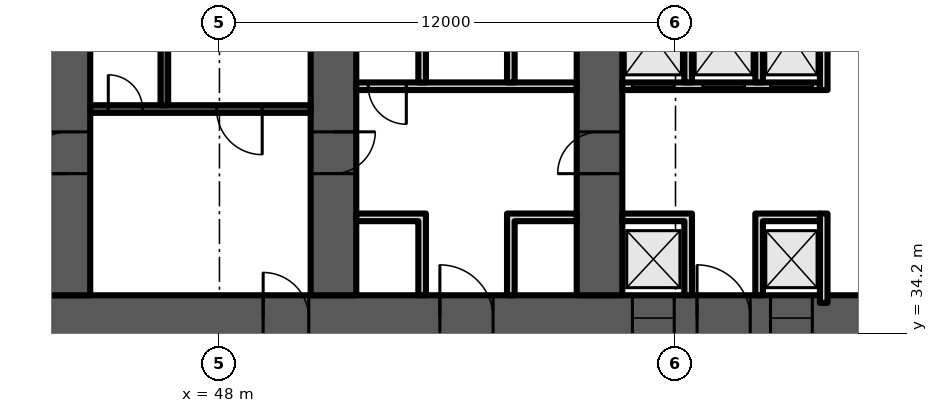
"""IFC4 building model, lengths in metres.
Left out: names, types, materials, properties, quantities, classifications, styles, units other than length and angle.
Written with IfcOpenShell. Run it as: python <this file> out.ifc"""

import sys

from ifc_helpers import new_model, si_unit, direction, frame, frame_2d, origin, place, context, subcontext, project, spatial, polyline, rectangle, outline, extrude, element, fill, save


model = new_model("IFC4")
c1 = context("Model", 3, precision=1e-05, world=origin(), true_north=direction((0.0, 1.0)))
c2 = subcontext(c1, "Body", "Model", "MODEL_VIEW")
j1 = project(units=[si_unit("LENGTHUNIT", "METRE"), si_unit("PLANEANGLEUNIT", "RADIAN")], contexts=[c1])
p1 = place(None, origin())
s1 = spatial("IfcSite", under=j1, at=p1, CompositionType="ELEMENT")
p2 = place(p1, origin())
s2 = spatial("IfcBuilding", under=s1, at=p2, CompositionType="ELEMENT")
p3 = place(p2, frame((0.0, 0.0, 33.0)))
s3 = spatial("IfcBuildingStorey", under=s2, at=p3, CompositionType="ELEMENT", Elevation=33.0)
p4 = place(p3, frame((9.0, 34.6, 0.0), z_axis=(0.0, 0.0, 1.0), x_axis=(1.0, 0.0, 0.0)))
e1 = element("IfcWall", 1, at=p4, inside=s3, PredefinedType="SHEAR", context=c2, shape_type="SweptSolid", body=[
    extrude(rectangle(XDim=56.0, YDim=1.2, at=frame_2d((28.0, 0.0))), origin(), (0.0, 0.0, 1.0), 8.1),
])
p5 = place(p4, frame((2.0, 0.0, 0.0)))
e2 = element("IfcOpeningElement", 2, at=p5, cuts=e1, PredefinedType="OPENING", context=c2, shape_type="SweptSolid", body=[
    extrude(rectangle(XDim=1.0, YDim=2.1, at=frame_2d((0.5, 1.05))), frame((0.0, 0.61, 0.0), z_axis=(0.0, -1.0, 0.0), x_axis=(1.0, 0.0, 0.0)), (0.0, 0.0, 1.0), 1.22),
])
p6 = place(p4, frame((4.6, 0.0, 0.0)))
e3 = element("IfcOpeningElement", 3, at=p6, cuts=e1, PredefinedType="OPENING", context=c2, shape_type="SweptSolid", body=[
    extrude(rectangle(XDim=1.0, YDim=2.1, at=frame_2d((0.5, 1.05))), frame((0.0, 0.61, 0.0), z_axis=(0.0, -1.0, 0.0), x_axis=(1.0, 0.0, 0.0)), (0.0, 0.0, 1.0), 1.22),
])
p7 = place(p4, frame((7.867, 0.0, 0.0)))
e4 = element("IfcOpeningElement", 4, at=p7, cuts=e1, PredefinedType="OPENING", context=c2, shape_type="SweptSolid", body=[
    extrude(rectangle(XDim=1.1, YDim=2.1, at=frame_2d((0.55, 1.05))), frame((0.0, 0.61, 0.0), z_axis=(0.0, -1.0, 0.0), x_axis=(1.0, 0.0, 0.0)), (0.0, 0.0, 1.0), 1.22),
])
p8 = place(p4, frame((12.033, 0.0, 0.0)))
e5 = element("IfcOpeningElement", 5, at=p8, cuts=e1, PredefinedType="OPENING", context=c2, shape_type="SweptSolid", body=[
    extrude(rectangle(XDim=1.1, YDim=2.1, at=frame_2d((0.55, 1.05))), frame((0.0, 0.61, 0.0), z_axis=(0.0, -1.0, 0.0), x_axis=(1.0, 0.0, 0.0)), (0.0, 0.0, 1.0), 1.22),
])
p9 = place(p4, frame((9.8, 0.0, 0.0)))
e6 = element("IfcOpeningElement", 6, at=p9, cuts=e1, PredefinedType="OPENING", context=c2, shape_type="SweptSolid", body=[
    extrude(rectangle(XDim=1.4, YDim=2.1, at=frame_2d((0.7, 1.05))), frame((0.0, 0.61, 0.0), z_axis=(0.0, -1.0, 0.0), x_axis=(1.0, 0.0, 0.0)), (0.0, 0.0, 1.0), 1.22),
])
p10 = place(p4, frame((14.65, 0.0, 0.0)))
e7 = element("IfcOpeningElement", 7, at=p10, cuts=e1, PredefinedType="OPENING", context=c2, shape_type="SweptSolid", body=[
    extrude(rectangle(XDim=1.2, YDim=2.1, at=frame_2d((0.6, 1.05))), frame((0.0, 0.61, 0.0), z_axis=(0.0, -1.0, 0.0), x_axis=(1.0, 0.0, 0.0)), (0.0, 0.0, 1.0), 1.22),
])
p11 = place(p4, frame((21.867, 0.0, 0.0)))
e8 = element("IfcOpeningElement", 8, at=p11, cuts=e1, PredefinedType="OPENING", context=c2, shape_type="SweptSolid", body=[
    extrude(rectangle(XDim=1.1, YDim=2.1, at=frame_2d((0.55, 1.05))), frame((0.0, 0.61, 0.0), z_axis=(0.0, -1.0, 0.0), x_axis=(1.0, 0.0, 0.0)), (0.0, 0.0, 1.0), 1.22),
])
p12 = place(p4, frame((26.033, 0.0, 0.0)))
e9 = element("IfcOpeningElement", 9, at=p12, cuts=e1, PredefinedType="OPENING", context=c2, shape_type="SweptSolid", body=[
    extrude(rectangle(XDim=1.1, YDim=2.1, at=frame_2d((0.55, 1.05))), frame((0.0, 0.61, 0.0), z_axis=(0.0, -1.0, 0.0), x_axis=(1.0, 0.0, 0.0)), (0.0, 0.0, 1.0), 1.22),
])
p13 = place(p4, frame((23.8, 0.0, 0.0)))
e10 = element("IfcOpeningElement", 10, at=p13, cuts=e1, PredefinedType="OPENING", context=c2, shape_type="SweptSolid", body=[
    extrude(rectangle(XDim=1.4, YDim=2.1, at=frame_2d((0.7, 1.05))), frame((0.0, 0.61, 0.0), z_axis=(0.0, -1.0, 0.0), x_axis=(1.0, 0.0, 0.0)), (0.0, 0.0, 1.0), 1.22),
])
p14 = place(p4, frame((28.867, 0.0, 0.0)))
e11 = element("IfcOpeningElement", 11, at=p14, cuts=e1, PredefinedType="OPENING", context=c2, shape_type="SweptSolid", body=[
    extrude(rectangle(XDim=1.1, YDim=2.1, at=frame_2d((0.55, 1.05))), frame((0.0, 0.61, 0.0), z_axis=(0.0, -1.0, 0.0), x_axis=(1.0, 0.0, 0.0)), (0.0, 0.0, 1.0), 1.22),
])
p15 = place(p4, frame((33.033, 0.0, 0.0)))
e12 = element("IfcOpeningElement", 12, at=p15, cuts=e1, PredefinedType="OPENING", context=c2, shape_type="SweptSolid", body=[
    extrude(rectangle(XDim=1.1, YDim=2.1, at=frame_2d((0.55, 1.05))), frame((0.0, 0.61, 0.0), z_axis=(0.0, -1.0, 0.0), x_axis=(1.0, 0.0, 0.0)), (0.0, 0.0, 1.0), 1.22),
])
p16 = place(p4, frame((40.15, 0.0, 0.0)))
e13 = element("IfcOpeningElement", 13, at=p16, cuts=e1, PredefinedType="OPENING", context=c2, shape_type="SweptSolid", body=[
    extrude(rectangle(XDim=1.2, YDim=2.1, at=frame_2d((0.6, 1.05))), frame((0.0, 0.61, 0.0), z_axis=(0.0, -1.0, 0.0), x_axis=(1.0, 0.0, 0.0)), (0.0, 0.0, 1.0), 1.22),
])
p17 = place(p4, frame((44.8, 0.0, 0.0)))
e14 = element("IfcOpeningElement", 14, at=p17, cuts=e1, PredefinedType="OPENING", context=c2, shape_type="SweptSolid", body=[
    extrude(rectangle(XDim=1.4, YDim=2.1, at=frame_2d((0.7, 1.05))), frame((0.0, 0.61, 0.0), z_axis=(0.0, -1.0, 0.0), x_axis=(1.0, 0.0, 0.0)), (0.0, 0.0, 1.0), 1.22),
])
p18 = place(p4, frame((49.867, 0.0, 0.0)))
e15 = element("IfcOpeningElement", 15, at=p18, cuts=e1, PredefinedType="OPENING", context=c2, shape_type="SweptSolid", body=[
    extrude(rectangle(XDim=1.1, YDim=2.1, at=frame_2d((0.55, 1.05))), frame((0.0, 0.61, 0.0), z_axis=(0.0, -1.0, 0.0), x_axis=(1.0, 0.0, 0.0)), (0.0, 0.0, 1.0), 1.22),
])
p19 = place(p4, frame((53.5, 0.0, 0.0)))
e16 = element("IfcOpeningElement", 16, at=p19, cuts=e1, PredefinedType="OPENING", context=c2, shape_type="SweptSolid", body=[
    extrude(rectangle(XDim=1.1, YDim=2.1, at=frame_2d((0.55, 1.05))), frame((0.0, 0.61, 0.0), z_axis=(0.0, -1.0, 0.0), x_axis=(1.0, 0.0, 0.0)), (0.0, 0.0, 1.0), 1.22),
])
p20 = place(p4, frame((51.567, 0.0, 0.0)))
e17 = element("IfcOpeningElement", 17, at=p20, cuts=e1, PredefinedType="OPENING", context=c2, shape_type="SweptSolid", body=[
    extrude(rectangle(XDim=1.4, YDim=2.1, at=frame_2d((0.7, 1.05))), frame((0.0, 0.61, 0.0), z_axis=(0.0, -1.0, 0.0), x_axis=(1.0, 0.0, 0.0)), (0.0, 0.0, 1.0), 1.22),
])
p21 = place(p3, frame((44.0, 35.2, 0.0), z_axis=(0.0, 0.0, 1.0), x_axis=(0.0, 1.0, 0.0)))
e18 = element("IfcWall", 18, at=p21, inside=s3, PredefinedType="SHEAR", context=c2, shape_type="SweptSolid", body=[
    extrude(rectangle(XDim=12.8, YDim=1.2, at=frame_2d((6.4, 0.0))), origin(), (0.0, 0.0, 1.0), 8.1),
])
p22 = place(p21, frame((3.2, 0.0, 0.0)))
e19 = element("IfcOpeningElement", 19, at=p22, cuts=e18, PredefinedType="OPENING", context=c2, shape_type="SweptSolid", body=[
    extrude(rectangle(XDim=1.1, YDim=2.1, at=frame_2d((0.55, 1.05))), frame((0.0, 0.61, 0.0), z_axis=(0.0, -1.0, 0.0), x_axis=(1.0, 0.0, 0.0)), (0.0, 0.0, 1.0), 1.22),
])
p23 = place(p21, frame((9.6, 0.0, 0.0)))
e20 = element("IfcOpeningElement", 20, at=p23, cuts=e18, PredefinedType="OPENING", context=c2, shape_type="SweptSolid", body=[
    extrude(rectangle(XDim=1.0, YDim=2.1, at=frame_2d((0.5, 1.05))), frame((0.0, 0.61, 0.0), z_axis=(0.0, -1.0, 0.0), x_axis=(1.0, 0.0, 0.0)), (0.0, 0.0, 1.0), 1.22),
])
p24 = place(p3, frame((51.0, 35.2, 0.0), z_axis=(0.0, 0.0, 1.0), x_axis=(0.0, 1.0, 0.0)))
e21 = element("IfcWall", 21, at=p24, inside=s3, PredefinedType="SHEAR", context=c2, shape_type="SweptSolid", body=[
    extrude(rectangle(XDim=12.8, YDim=1.2, at=frame_2d((6.4, 0.0))), origin(), (0.0, 0.0, 1.0), 8.1),
])
p25 = place(p24, frame((3.2, 0.0, 0.0)))
e22 = element("IfcOpeningElement", 22, at=p25, cuts=e21, PredefinedType="OPENING", context=c2, shape_type="SweptSolid", body=[
    extrude(rectangle(XDim=1.1, YDim=2.1, at=frame_2d((0.55, 1.05))), frame((0.0, 0.61, 0.0), z_axis=(0.0, -1.0, 0.0), x_axis=(1.0, 0.0, 0.0)), (0.0, 0.0, 1.0), 1.22),
])
p26 = place(p3, frame((58.0, 35.2, 0.0), z_axis=(0.0, 0.0, 1.0), x_axis=(0.0, 1.0, 0.0)))
e23 = element("IfcWall", 23, at=p26, inside=s3, PredefinedType="SHEAR", context=c2, shape_type="SweptSolid", body=[
    extrude(rectangle(XDim=12.8, YDim=1.2, at=frame_2d((6.4, 0.0))), origin(), (0.0, 0.0, 1.0), 8.1),
])
p27 = place(p26, frame((10.134, 0.0, 0.0)))
e24 = element("IfcOpeningElement", 24, at=p27, cuts=e23, PredefinedType="OPENING", context=c2, shape_type="SweptSolid", body=[
    extrude(rectangle(XDim=1.0, YDim=2.1, at=frame_2d((0.5, 1.05))), frame((0.0, 0.61, 0.0), z_axis=(0.0, -1.0, 0.0), x_axis=(1.0, 0.0, 0.0)), (0.0, 0.0, 1.0), 1.22),
])
p28 = place(p26, frame((3.2, 0.0, 0.0)))
e25 = element("IfcOpeningElement", 25, at=p28, cuts=e23, PredefinedType="OPENING", context=c2, shape_type="SweptSolid", body=[
    extrude(rectangle(XDim=1.1, YDim=2.1, at=frame_2d((0.55, 1.05))), frame((0.0, 0.61, 0.0), z_axis=(0.0, -1.0, 0.0), x_axis=(1.0, 0.0, 0.0)), (0.0, 0.0, 1.0), 1.22),
])
p29 = place(p3, frame((44.6, 40.1, 0.0), z_axis=(0.0, 0.0, 1.0), x_axis=(1.0, 0.0, 0.0)))
e26 = element("IfcWall", 26, at=p29, inside=s3, PredefinedType="SHEAR", context=c2, shape_type="SweptSolid", body=[
    extrude(rectangle(XDim=5.8, YDim=0.2, at=frame_2d((2.9, 0.0))), origin(), (0.0, 0.0, 1.0), 8.1),
])
p30 = place(p29, frame((3.325, 0.0, 0.0)))
e27 = element("IfcOpeningElement", 27, at=p30, cuts=e26, PredefinedType="OPENING", context=c2, shape_type="SweptSolid", body=[
    extrude(rectangle(XDim=1.2, YDim=2.1, at=frame_2d((0.6, 1.05))), frame((0.0, 0.11, 0.0), z_axis=(0.0, -1.0, 0.0), x_axis=(1.0, 0.0, 0.0)), (0.0, 0.0, 1.0), 0.22),
])
p31 = place(p29, frame((0.475, 0.0, 0.0)))
e28 = element("IfcOpeningElement", 28, at=p31, cuts=e26, PredefinedType="OPENING", context=c2, shape_type="SweptSolid", body=[
    extrude(rectangle(XDim=0.9, YDim=2.1, at=frame_2d((0.45, 1.05))), frame((0.0, 0.11, 0.0), z_axis=(0.0, -1.0, 0.0), x_axis=(1.0, 0.0, 0.0)), (0.0, 0.0, 1.0), 0.22),
])
p32 = place(p3, frame((46.55, 40.2, 0.0), z_axis=(0.0, 0.0, 1.0), x_axis=(0.0, 1.0, 0.0)))
e29 = element("IfcWall", 29, at=p32, inside=s3, PredefinedType="SHEAR", context=c2, shape_type="SweptSolid", body=[
    extrude(rectangle(XDim=7.2, YDim=0.2, at=frame_2d((3.6, 0.0))), origin(), (0.0, 0.0, 1.0), 8.1),
])
p33 = place(p3, frame((51.6, 40.7, 0.0), z_axis=(0.0, 0.0, 1.0), x_axis=(1.0, 0.0, 0.0)))
e30 = element("IfcWall", 30, at=p33, inside=s3, PredefinedType="PARTITIONING", context=c2, shape_type="SweptSolid", body=[
    extrude(rectangle(XDim=5.8, YDim=0.2, at=frame_2d((2.9, 0.0))), origin(), (0.0, 0.0, 1.0), 8.1),
])
p34 = place(p33, frame((0.317, 0.0, 0.0)))
e31 = element("IfcOpeningElement", 31, at=p34, cuts=e30, PredefinedType="OPENING", context=c2, shape_type="SweptSolid", body=[
    extrude(rectangle(XDim=1.0, YDim=2.1, at=frame_2d((0.5, 1.05))), frame((0.0, 0.11, 0.0), z_axis=(0.0, -1.0, 0.0), x_axis=(1.0, 0.0, 0.0)), (0.0, 0.0, 1.0), 0.22),
])
p35 = place(p3, origin())
e32 = element("IfcWall", 32, at=p35, inside=s3, PredefinedType="PARTITIONING", context=c2, shape_type="SweptSolid", body=[
    extrude(outline(polyline([(53.233, 37.15), (51.6, 37.15), (51.6, 37.35), (53.233, 37.35), (53.433, 37.35), (53.433, 35.2), (53.233, 35.2), (53.233, 37.15)])), origin(), (0.0, 0.0, 1.0), 8.1),
])
p36 = place(p3, origin())
e33 = element("IfcWall", 33, at=p36, inside=s3, PredefinedType="PARTITIONING", context=c2, shape_type="SweptSolid", body=[
    extrude(outline(polyline([(55.567, 37.35), (55.767, 37.35), (57.4, 37.35), (57.4, 37.15), (55.767, 37.15), (55.767, 35.2), (55.567, 35.2), (55.567, 37.35)])), origin(), (0.0, 0.0, 1.0), 8.1),
])
p37 = place(p3, origin())
e34 = element("IfcWall", 34, at=p37, inside=s3, PredefinedType="PARTITIONING", context=c2, shape_type="SweptSolid", body=[
    extrude(outline(polyline([(53.233, 40.8), (53.233, 43.8), (53.433, 43.8), (53.433, 40.8), (53.233, 40.8)])), origin(), (0.0, 0.0, 1.0), 8.1),
])
p38 = place(p3, origin())
e35 = element("IfcWall", 35, at=p38, inside=s3, PredefinedType="PARTITIONING", context=c2, shape_type="SweptSolid", body=[
    extrude(outline(polyline([(55.567, 40.8), (55.567, 43.8), (55.767, 43.8), (55.767, 40.8), (55.567, 40.8)])), origin(), (0.0, 0.0, 1.0), 8.1),
])
p39 = place(p3, frame((58.6, 40.7, 0.0), z_axis=(0.0, 0.0, 1.0), x_axis=(1.0, 0.0, 0.0)))
e36 = element("IfcWall", 36, at=p39, inside=s3, PredefinedType="PARTITIONING", context=c2, shape_type="SweptSolid", body=[
    extrude(rectangle(XDim=5.2, YDim=0.2, at=frame_2d((2.6, 0.0))), origin(), (0.0, 0.0, 1.0), 8.1),
])
p40 = place(p39, frame((0.267, 0.0, 0.0)))
e37 = element("IfcOpeningElement", 37, at=p40, cuts=e36, PredefinedType="OPENING", context=c2, shape_type="SweptSolid", body=[
    extrude(rectangle(XDim=1.1, YDim=2.1, at=frame_2d((0.55, 1.05))), frame((0.0, 0.11, 0.0), z_axis=(0.0, -1.0, 0.0), x_axis=(1.0, 0.0, 0.0)), (0.0, 0.0, 1.0), 0.22),
])
p41 = place(p39, frame((2.117, 0.0, 0.0)))
e38 = element("IfcOpeningElement", 38, at=p41, cuts=e36, PredefinedType="OPENING", context=c2, shape_type="SweptSolid", body=[
    extrude(rectangle(XDim=1.1, YDim=2.1, at=frame_2d((0.55, 1.05))), frame((0.0, 0.11, 0.0), z_axis=(0.0, -1.0, 0.0), x_axis=(1.0, 0.0, 0.0)), (0.0, 0.0, 1.0), 0.22),
])
p42 = place(p39, frame((3.9, 0.0, 0.0)))
e39 = element("IfcOpeningElement", 39, at=p42, cuts=e36, PredefinedType="OPENING", context=c2, shape_type="SweptSolid", body=[
    extrude(rectangle(XDim=1.1, YDim=2.1, at=frame_2d((0.55, 1.05))), frame((0.0, 0.11, 0.0), z_axis=(0.0, -1.0, 0.0), x_axis=(1.0, 0.0, 0.0)), (0.0, 0.0, 1.0), 0.22),
])
p43 = place(p3, origin())
e40 = element("IfcWall", 40, at=p43, inside=s3, PredefinedType="PARTITIONING", context=c2, shape_type="SweptSolid", body=[
    extrude(outline(polyline([(60.233, 37.15), (58.6, 37.15), (58.6, 37.35), (60.233, 37.35), (60.433, 37.35), (60.433, 35.2), (60.233, 35.2), (60.233, 37.15)])), origin(), (0.0, 0.0, 1.0), 8.1),
])
p44 = place(p3, origin())
e41 = element("IfcWall", 41, at=p44, inside=s3, PredefinedType="PARTITIONING", context=c2, shape_type="SweptSolid", body=[
    extrude(outline(polyline([(62.1, 37.35), (62.3, 37.35), (63.8, 37.35), (63.8, 37.15), (62.3, 37.15), (62.3, 35.2), (62.1, 35.2), (62.1, 37.35)])), origin(), (0.0, 0.0, 1.0), 8.1),
])
p45 = place(p3, origin())
e42 = element("IfcWall", 42, at=p45, inside=s3, PredefinedType="PARTITIONING", context=c2, shape_type="SweptSolid", body=[
    extrude(outline(polyline([(60.433, 40.8), (60.233, 40.8), (60.233, 43.8), (58.6, 43.8), (58.6, 44.0), (63.8, 44.0), (63.8, 43.8), (62.3, 43.8), (62.3, 40.8), (62.1, 40.8), (62.1, 43.8), (60.433, 43.8), (60.433, 40.8)])), origin(), (0.0, 0.0, 1.0), 8.1),
])
p46 = place(p3, frame((63.9, 35.0, 0.0), z_axis=(0.0, 0.0, 1.0), x_axis=(0.0, 1.0, 0.0)))
e43 = element("IfcWall", 43, at=p46, inside=s3, PredefinedType="PARTITIONING", context=c2, shape_type="SweptSolid", body=[
    extrude(rectangle(XDim=2.35, YDim=0.2, at=frame_2d((1.175, 0.0))), origin(), (0.0, 0.0, 1.0), 8.1),
])
p47 = place(p3, frame((63.9, 40.6, 0.0), z_axis=(0.0, 0.0, 1.0), x_axis=(0.0, 1.0, 0.0)))
e44 = element("IfcWall", 44, at=p47, inside=s3, PredefinedType="PARTITIONING", context=c2, shape_type="SweptSolid", body=[
    extrude(rectangle(XDim=3.4, YDim=0.2, at=frame_2d((1.7, 0.0))), origin(), (0.0, 0.0, 1.0), 8.1),
])
p48 = place(p30, origin())
e45 = element("IfcDoor", 45, at=p48, inside=s3, OperationType="SINGLE_SWING_RIGHT", PredefinedType="DOOR", context=c2, shape_type="SweptSolid", body=[
    extrude(rectangle(XDim=1.2, YDim=2.1, at=frame_2d((0.6, 1.05))), frame((0.0, 0.025, 0.0), z_axis=(0.0, -1.0, 0.0), x_axis=(1.0, 0.0, 0.0)), (0.0, 0.0, 1.0), 0.05),
])
fill(e27, e45)
p49 = place(p31, origin())
e46 = element("IfcDoor", 46, at=p49, inside=s3, OperationType="SINGLE_SWING_LEFT", PredefinedType="DOOR", context=c2, shape_type="SweptSolid", body=[
    extrude(rectangle(XDim=0.9, YDim=2.1, at=frame_2d((0.45, 1.05))), frame((0.0, 0.025, 0.0), z_axis=(0.0, -1.0, 0.0), x_axis=(1.0, 0.0, 0.0)), (0.0, 0.0, 1.0), 0.05),
])
fill(e28, e46)
p50 = place(p16, origin())
e47 = element("IfcDoor", 47, at=p50, inside=s3, OperationType="SINGLE_SWING_LEFT", PredefinedType="DOOR", context=c2, shape_type="SweptSolid", body=[
    extrude(rectangle(XDim=1.2, YDim=2.1, at=frame_2d((0.6, 1.05))), frame((0.0, 0.025, 0.0), z_axis=(0.0, -1.0, 0.0), x_axis=(1.0, 0.0, 0.0)), (0.0, 0.0, 1.0), 0.05),
])
fill(e13, e47)
p51 = place(p17, origin())
e48 = element("IfcDoor", 48, at=p51, inside=s3, OperationType="DOUBLE_DOOR_SINGLE_SWING", PredefinedType="DOOR", context=c2, shape_type="SweptSolid", body=[
    extrude(rectangle(XDim=1.4, YDim=2.1, at=frame_2d((0.7, 1.05))), frame((0.0, 0.025, 0.0), z_axis=(0.0, -1.0, 0.0), x_axis=(1.0, 0.0, 0.0)), (0.0, 0.0, 1.0), 0.05),
])
fill(e14, e48)
p52 = place(p34, origin())
e49 = element("IfcDoor", 49, at=p52, inside=s3, OperationType="SINGLE_SWING_RIGHT", PredefinedType="DOOR", context=c2, shape_type="SweptSolid", body=[
    extrude(rectangle(XDim=1.0, YDim=2.1, at=frame_2d((0.5, 1.05))), frame((0.0, 0.025, 0.0), z_axis=(0.0, -1.0, 0.0), x_axis=(1.0, 0.0, 0.0)), (0.0, 0.0, 1.0), 0.05),
])
fill(e31, e49)
p53 = place(p18, origin())
e50 = element("IfcDoor", 50, at=p53, inside=s3, OperationType="DOUBLE_DOOR_SLIDING", PredefinedType="DOOR", context=c2, shape_type="SweptSolid", body=[
    extrude(rectangle(XDim=1.1, YDim=2.1, at=frame_2d((0.55, 1.05))), frame((0.0, 0.025, 0.0), z_axis=(0.0, -1.0, 0.0), x_axis=(1.0, 0.0, 0.0)), (0.0, 0.0, 1.0), 0.05),
])
fill(e15, e50)
p54 = place(p19, origin())
e51 = element("IfcDoor", 51, at=p54, inside=s3, OperationType="DOUBLE_DOOR_SLIDING", PredefinedType="DOOR", context=c2, shape_type="SweptSolid", body=[
    extrude(rectangle(XDim=1.1, YDim=2.1, at=frame_2d((0.55, 1.05))), frame((0.0, 0.025, 0.0), z_axis=(0.0, -1.0, 0.0), x_axis=(1.0, 0.0, 0.0)), (0.0, 0.0, 1.0), 0.05),
])
fill(e16, e51)
p55 = place(p20, origin())
e52 = element("IfcDoor", 52, at=p55, inside=s3, OperationType="DOUBLE_DOOR_SINGLE_SWING", PredefinedType="DOOR", context=c2, shape_type="SweptSolid", body=[
    extrude(rectangle(XDim=1.4, YDim=2.1, at=frame_2d((0.7, 1.05))), frame((0.0, 0.025, 0.0), z_axis=(0.0, -1.0, 0.0), x_axis=(1.0, 0.0, 0.0)), (0.0, 0.0, 1.0), 0.05),
])
fill(e17, e52)
p56 = place(p40, origin())
e53 = element("IfcDoor", 53, at=p56, inside=s3, OperationType="DOUBLE_DOOR_SLIDING", PredefinedType="DOOR", context=c2, shape_type="SweptSolid", body=[
    extrude(rectangle(XDim=1.1, YDim=2.1, at=frame_2d((0.55, 1.05))), frame((0.0, 0.025, 0.0), z_axis=(0.0, -1.0, 0.0), x_axis=(1.0, 0.0, 0.0)), (0.0, 0.0, 1.0), 0.05),
])
fill(e37, e53)
p57 = place(p41, origin())
e54 = element("IfcDoor", 54, at=p57, inside=s3, OperationType="DOUBLE_DOOR_SLIDING", PredefinedType="DOOR", context=c2, shape_type="SweptSolid", body=[
    extrude(rectangle(XDim=1.1, YDim=2.1, at=frame_2d((0.55, 1.05))), frame((0.0, 0.025, 0.0), z_axis=(0.0, -1.0, 0.0), x_axis=(1.0, 0.0, 0.0)), (0.0, 0.0, 1.0), 0.05),
])
fill(e38, e54)
p58 = place(p42, origin())
e55 = element("IfcDoor", 55, at=p58, inside=s3, OperationType="DOUBLE_DOOR_SLIDING", PredefinedType="DOOR", context=c2, shape_type="SweptSolid", body=[
    extrude(rectangle(XDim=1.1, YDim=2.1, at=frame_2d((0.55, 1.05))), frame((0.0, 0.025, 0.0), z_axis=(0.0, -1.0, 0.0), x_axis=(1.0, 0.0, 0.0)), (0.0, 0.0, 1.0), 0.05),
])
fill(e39, e55)
p59 = place(p22, origin())
e56 = element("IfcDoor", 56, at=p59, inside=s3, OperationType="SINGLE_SWING_LEFT", PredefinedType="DOOR", context=c2, shape_type="SweptSolid", body=[
    extrude(rectangle(XDim=1.1, YDim=2.1, at=frame_2d((0.55, 1.05))), frame((0.0, 0.025, 0.0), z_axis=(0.0, -1.0, 0.0), x_axis=(1.0, 0.0, 0.0)), (0.0, 0.0, 1.0), 0.05),
])
fill(e19, e56)
p60 = place(p25, origin())
e57 = element("IfcDoor", 57, at=p60, inside=s3, OperationType="SINGLE_SWING_RIGHT", PredefinedType="DOOR", context=c2, shape_type="SweptSolid", body=[
    extrude(rectangle(XDim=1.1, YDim=2.1, at=frame_2d((0.55, 1.05))), frame((0.0, 0.025, 0.0), z_axis=(0.0, -1.0, 0.0), x_axis=(1.0, 0.0, 0.0)), (0.0, 0.0, 1.0), 0.05),
])
fill(e22, e57)
p61 = place(p28, origin())
e58 = element("IfcDoor", 58, at=p61, inside=s3, OperationType="SINGLE_SWING_LEFT", PredefinedType="DOOR", context=c2, shape_type="SweptSolid", body=[
    extrude(rectangle(XDim=1.1, YDim=2.1, at=frame_2d((0.55, 1.05))), frame((0.0, 0.025, 0.0), z_axis=(0.0, -1.0, 0.0), x_axis=(1.0, 0.0, 0.0)), (0.0, 0.0, 1.0), 0.05),
])
fill(e25, e58)
save(model, sys.argv[1])
